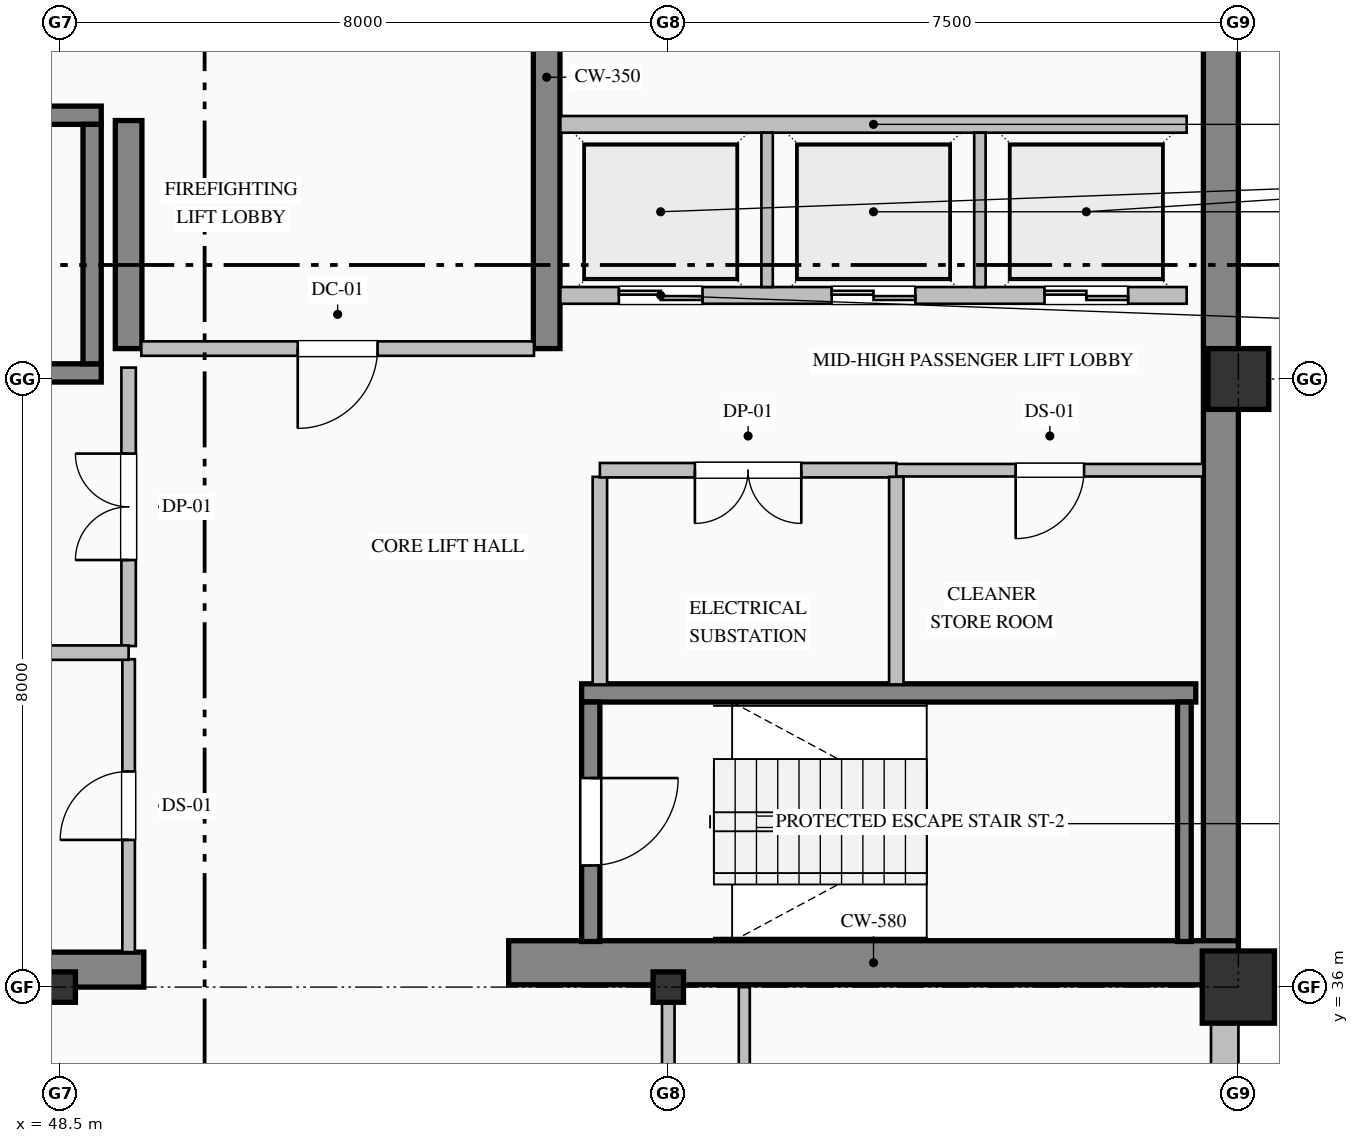
"""IFC4 building model, lengths in metres.
Left out: names, types, materials, properties, quantities, classifications, styles, units other than length and angle.
Written with IfcOpenShell. Run it as: python <this file> out.ifc"""

import sys

from ifc_helpers import new_model, si_unit, direction, frame, frame_2d, origin, origin_2d, place, context, subcontext, project, spatial, rectangle, hollow_rectangle, i_section, extrude, element, fill, save


model = new_model("IFC4")
c1 = context("Model", 3, precision=1e-05, world=origin(), true_north=direction((0.0, 1.0)))
c2 = subcontext(c1, "Body", "Model", "MODEL_VIEW")
j1 = project(units=[si_unit("LENGTHUNIT", "METRE"), si_unit("PLANEANGLEUNIT", "RADIAN")], contexts=[c1])
p1 = place(None, origin())
s1 = spatial("IfcSite", under=j1, at=p1, CompositionType="ELEMENT")
p2 = place(p1, origin())
s2 = spatial("IfcBuilding", under=s1, at=p2, CompositionType="ELEMENT")
p3 = place(p2, frame((0.0, 0.0, 249.8)))
s3 = spatial("IfcBuildingStorey", under=s2, at=p3, CompositionType="ELEMENT", Elevation=249.8)
p4 = place(p3, frame((63.77, 36.32, 0.0), z_axis=(0.0, 0.0, 1.0), x_axis=(0.0, 1.0, 0.0)))
e1 = element("IfcWall", 1, at=p4, inside=s3, PredefinedType="SHEAR", context=c2, shape_type="SweptSolid", body=[
    extrude(rectangle(XDim=15.22, YDim=0.46, at=frame_2d((7.61, 0.0))), origin(), (0.0, 0.0, 1.0), 3.775),
])
p5 = place(p3, frame((40.5, 36.23, 0.0), z_axis=(0.0, 0.0, 1.0), x_axis=(1.0, 0.0, 0.0)))
e2 = element("IfcWall", 2, at=p5, inside=s3, PredefinedType="SHEAR", context=c2, shape_type="SweptSolid", body=[
    extrude(rectangle(XDim=9.1, YDim=0.46, at=frame_2d((4.55, 0.0))), origin(), (0.0, 0.0, 1.0), 3.775),
])
p6 = place(p3, frame((54.4, 36.32, 0.0), z_axis=(0.0, 0.0, 1.0), x_axis=(1.0, 0.0, 0.0)))
e3 = element("IfcWall", 3, at=p6, inside=s3, PredefinedType="SHEAR", context=c2, shape_type="SweptSolid", body=[
    extrude(rectangle(XDim=9.6, YDim=0.58, at=frame_2d((4.8, 0.0))), origin(), (0.0, 0.0, 1.0), 4.0),
])
p7 = place(p3, frame((49.4, 44.4, 0.0), z_axis=(0.0, 0.0, 1.0), x_axis=(0.0, 1.0, 0.0)))
e4 = element("IfcWall", 4, at=p7, inside=s3, PredefinedType="SHEAR", context=c2, shape_type="SweptSolid", body=[
    extrude(rectangle(XDim=3.0, YDim=0.35, at=frame_2d((1.5, 0.0))), origin(), (0.0, 0.0, 1.0), 3.775),
])
p8 = place(p3, frame((54.9, 44.4, 0.0), z_axis=(0.0, 0.0, 1.0), x_axis=(0.0, 1.0, 0.0)))
e5 = element("IfcWall", 5, at=p8, inside=s3, PredefinedType="SHEAR", context=c2, shape_type="SweptSolid", body=[
    extrude(rectangle(XDim=7.14, YDim=0.35, at=frame_2d((3.57, 0.0))), origin(), (0.0, 0.0, 1.0), 3.775),
])
for number, where, z_axis, x_axis in (
    (6, (48.5, 36.0, 0.0), (0.0, 0.0, 1.0), (1.0, 0.0, 0.0)),
    (7, (56.5, 36.0, 0.0), (0.0, 0.0, 1.0), (1.0, 0.0, 0.0)),
):
    element("IfcColumn", number, at=place(p3, frame(where, z_axis=z_axis, x_axis=x_axis)), inside=s3, PredefinedType="COLUMN", context=c2, shape_type="SweptSolid", body=[
        extrude(i_section(OverallWidth=0.4, OverallDepth=0.4, WebThickness=0.013, FlangeThickness=0.021, FilletRadius=0.022, at=origin_2d()), origin(), (0.0, 0.0, 1.0), 4.0),
    ])
p9 = place(p3, frame((64.0, 36.0, 0.0), z_axis=(0.0, 0.0, 1.0), x_axis=(1.0, 0.0, 0.0)))
e8 = element("IfcColumn", 8, at=p9, inside=s3, PredefinedType="COLUMN", context=c2, shape_type="SweptSolid", body=[
    extrude(hollow_rectangle(XDim=0.95, YDim=0.95, WallThickness=0.036, at=origin_2d()), origin(), (0.0, 0.0, 1.0), 4.0),
])
p10 = place(p3, frame((64.0, 44.0, 0.0), z_axis=(0.0, 0.0, 1.0), x_axis=(1.0, 0.0, 0.0)))
e9 = element("IfcColumn", 9, at=p10, inside=s3, PredefinedType="COLUMN", context=c2, shape_type="SweptSolid", body=[
    extrude(hollow_rectangle(XDim=0.8, YDim=0.8, WallThickness=0.032, at=origin_2d()), origin(), (0.0, 0.0, 1.0), 4.0),
])
p11 = place(p3, frame((63.82, 36.05, 0.0), z_axis=(0.0, 0.0, 1.0), x_axis=(0.0, -1.0, 0.0)))
e10 = element("IfcWall", 10, at=p11, inside=s3, PredefinedType="SOLIDWALL", context=c2, shape_type="SweptSolid", body=[
    extrude(rectangle(XDim=19.55, YDim=0.36, at=frame_2d((9.775, 0.0))), origin(), (0.0, 0.0, 1.0), 3.325),
])
p12 = place(p11, frame((3.0, 0.0, 0.9)))
e11 = element("IfcOpeningElement", 11, at=p12, cuts=e10, PredefinedType="OPENING", context=c2, shape_type="SweptSolid", body=[
    extrude(rectangle(XDim=1.2, YDim=1.85, at=frame_2d((0.6, 0.925))), frame((0.0, 0.19, 0.0), z_axis=(0.0, -1.0, 0.0), x_axis=(1.0, 0.0, 0.0)), (0.0, 0.0, 1.0), 0.38),
])
p13 = place(p11, frame((10.05, 0.0, 0.7)))
e12 = element("IfcOpeningElement", 12, at=p13, cuts=e10, PredefinedType="OPENING", context=c2, shape_type="SweptSolid", body=[
    extrude(rectangle(XDim=1.5, YDim=2.4, at=frame_2d((0.75, 1.2))), frame((0.0, 0.19, 0.0), z_axis=(0.0, -1.0, 0.0), x_axis=(1.0, 0.0, 0.0)), (0.0, 0.0, 1.0), 0.38),
])
p14 = place(p11, frame((13.8, 0.0, 0.9)))
e13 = element("IfcOpeningElement", 13, at=p14, cuts=e10, PredefinedType="OPENING", context=c2, shape_type="SweptSolid", body=[
    extrude(rectangle(XDim=1.2, YDim=1.85, at=frame_2d((0.6, 0.925))), frame((0.0, 0.19, 0.0), z_axis=(0.0, -1.0, 0.0), x_axis=(1.0, 0.0, 0.0)), (0.0, 0.0, 1.0), 0.38),
])
for number, where, z_axis, x_axis in (
    (14, (40.96, 47.47, 0.0), (0.0, 0.0, 1.0), (1.0, 0.0, 0.0)),
    (15, (49.04, 44.08, 0.0), (0.0, 0.0, 1.0), (-1.0, 0.0, 0.0)),
):
    element("IfcWall", number, at=place(p3, frame(where, z_axis=z_axis, x_axis=x_axis)), inside=s3, PredefinedType="SOLIDWALL", context=c2, shape_type="SweptSolid", body=[
        extrude(rectangle(XDim=8.08, YDim=0.24, at=frame_2d((4.04, 0.0))), origin(), (0.0, 0.0, 1.0), 4.0),
    ])
p15 = place(p3, frame((48.92, 44.2, 0.0), z_axis=(0.0, 0.0, 1.0), x_axis=(0.0, 1.0, 0.0)))
e16 = element("IfcWall", 16, at=p15, inside=s3, PredefinedType="SOLIDWALL", context=c2, shape_type="SweptSolid", body=[
    extrude(rectangle(XDim=3.15, YDim=0.24, at=frame_2d((1.575, 0.0))), origin(), (0.0, 0.0, 1.0), 4.0),
])
p16 = place(p3, frame((55.36, 39.87, 0.0), z_axis=(0.0, 0.0, 1.0), x_axis=(1.0, 0.0, 0.0)))
e17 = element("IfcWall", 17, at=p16, inside=s3, PredefinedType="SOLIDWALL", context=c2, shape_type="SweptSolid", body=[
    extrude(rectangle(XDim=8.08, YDim=0.24, at=frame_2d((4.04, 0.0))), origin(), (0.0, 0.0, 1.0), 4.0),
])
p17 = place(p3, frame((55.48, 39.75, 0.0), z_axis=(0.0, 0.0, 1.0), x_axis=(0.0, -1.0, 0.0)))
e18 = element("IfcWall", 18, at=p17, inside=s3, PredefinedType="SOLIDWALL", context=c2, shape_type="SweptSolid", body=[
    extrude(rectangle(XDim=3.15, YDim=0.24, at=frame_2d((1.575, 0.0))), origin(), (0.0, 0.0, 1.0), 4.0),
])
p18 = place(p17, frame((1.0, 0.0, 0.0)))
e19 = element("IfcOpeningElement", 19, at=p18, cuts=e18, PredefinedType="OPENING", context=c2, shape_type="SweptSolid", body=[
    extrude(rectangle(XDim=1.15, YDim=2.2, at=frame_2d((0.575, 1.1))), frame((0.0, 0.13, 0.0), z_axis=(0.0, -1.0, 0.0), x_axis=(1.0, 0.0, 0.0)), (0.0, 0.0, 1.0), 0.26),
])
p19 = place(p3, frame((63.29, 36.6, 0.0), z_axis=(0.0, 0.0, 1.0), x_axis=(0.0, 1.0, 0.0)))
e20 = element("IfcWall", 20, at=p19, inside=s3, PredefinedType="SOLIDWALL", context=c2, shape_type="SweptSolid", body=[
    extrude(rectangle(XDim=3.15, YDim=0.18, at=frame_2d((1.575, 0.0))), origin(), (0.0, 0.0, 1.0), 4.0),
])
p20 = place(p3, frame((63.32, 45.1, 0.0), z_axis=(0.0, 0.0, 1.0), x_axis=(-1.0, 0.0, 0.0)))
e21 = element("IfcWall", 21, at=p20, inside=s3, PredefinedType="PARTITIONING", context=c2, shape_type="SweptSolid", body=[
    extrude(rectangle(XDim=8.24, YDim=0.22, at=frame_2d((4.12, 0.0))), origin(), (0.0, 0.0, 1.0), 3.775),
])
p21 = place(p20, frame((6.37, 0.0, 0.0)))
e22 = element("IfcOpeningElement", 22, at=p21, cuts=e21, PredefinedType="OPENING", context=c2, shape_type="SweptSolid", body=[
    extrude(rectangle(XDim=1.1, YDim=2.2, at=frame_2d((0.55, 1.1))), frame((0.0, 0.12, 0.0), z_axis=(0.0, -1.0, 0.0), x_axis=(1.0, 0.0, 0.0)), (0.0, 0.0, 1.0), 0.24),
])
p22 = place(p20, frame((3.57, 0.0, 0.0)))
e23 = element("IfcOpeningElement", 23, at=p22, cuts=e21, PredefinedType="OPENING", context=c2, shape_type="SweptSolid", body=[
    extrude(rectangle(XDim=1.1, YDim=2.2, at=frame_2d((0.55, 1.1))), frame((0.0, 0.12, 0.0), z_axis=(0.0, -1.0, 0.0), x_axis=(1.0, 0.0, 0.0)), (0.0, 0.0, 1.0), 0.24),
])
p23 = place(p20, frame((0.77, 0.0, 0.0)))
e24 = element("IfcOpeningElement", 24, at=p23, cuts=e21, PredefinedType="OPENING", context=c2, shape_type="SweptSolid", body=[
    extrude(rectangle(XDim=1.1, YDim=2.2, at=frame_2d((0.55, 1.1))), frame((0.0, 0.12, 0.0), z_axis=(0.0, -1.0, 0.0), x_axis=(1.0, 0.0, 0.0)), (0.0, 0.0, 1.0), 0.24),
])
p24 = place(p3, frame((55.08, 47.35, 0.0), z_axis=(0.0, 0.0, 1.0), x_axis=(1.0, 0.0, 0.0)))
e25 = element("IfcWall", 25, at=p24, inside=s3, PredefinedType="PARTITIONING", context=c2, shape_type="SweptSolid", body=[
    extrude(rectangle(XDim=8.24, YDim=0.22, at=frame_2d((4.12, 0.0))), origin(), (0.0, 0.0, 1.0), 3.775),
])
for number, where, z_axis, x_axis in (
    (26, (57.8, 45.21, 0.0), (0.0, 0.0, 1.0), (0.0, 1.0, 0.0)),
    (27, (60.6, 45.21, 0.0), (0.0, 0.0, 1.0), (0.0, 1.0, 0.0)),
):
    element("IfcWall", number, at=place(p3, frame(where, z_axis=z_axis, x_axis=x_axis)), inside=s3, PredefinedType="PARTITIONING", context=c2, shape_type="SweptSolid", body=[
        extrude(rectangle(XDim=2.03, YDim=0.15, at=frame_2d((1.015, 0.0))), origin(), (0.0, 0.0, 1.0), 3.775),
    ])
p25 = place(p3, frame((54.733, 44.4, 0.0), z_axis=(0.0, 0.0, 1.0), x_axis=(-1.0, 0.0, 0.0)))
e28 = element("IfcWall", 28, at=p25, inside=s3, PredefinedType="PARTITIONING", context=c2, shape_type="SweptSolid", body=[
    extrude(rectangle(XDim=5.166, YDim=0.19, at=frame_2d((2.583, 0.0))), origin(), (0.0, 0.0, 1.0), 3.775),
])
p26 = place(p25, frame((2.058, 0.0, 0.0)))
e29 = element("IfcOpeningElement", 29, at=p26, cuts=e28, PredefinedType="OPENING", context=c2, shape_type="SweptSolid", body=[
    extrude(rectangle(XDim=1.05, YDim=2.15, at=frame_2d((0.525, 1.075))), frame((0.0, 0.105, 0.0), z_axis=(0.0, -1.0, 0.0), x_axis=(1.0, 0.0, 0.0)), (0.0, 0.0, 1.0), 0.21),
])
p27 = place(p3, frame((49.4, 36.46, 0.0), z_axis=(0.0, 0.0, 1.0), x_axis=(0.0, 1.0, 0.0)))
e30 = element("IfcWall", 30, at=p27, inside=s3, PredefinedType="PARTITIONING", context=c2, shape_type="SweptSolid", body=[
    extrude(rectangle(XDim=3.853, YDim=0.165, at=frame_2d((1.927, 0.0))), origin(), (0.0, 0.0, 1.0), 3.017),
])
p28 = place(p27, frame((1.477, 0.0, 0.0)))
e31 = element("IfcOpeningElement", 31, at=p28, cuts=e30, PredefinedType="OPENING", context=c2, shape_type="SweptSolid", body=[
    extrude(rectangle(XDim=0.9, YDim=2.15, at=frame_2d((0.45, 1.075))), frame((0.0, 0.093, 0.0), z_axis=(0.0, -1.0, 0.0), x_axis=(1.0, 0.0, 0.0)), (0.0, 0.0, 1.0), 0.185),
])
p29 = place(p3, frame((49.4, 40.487, 0.0), z_axis=(0.0, 0.0, 1.0), x_axis=(0.0, 1.0, 0.0)))
e32 = element("IfcWall", 32, at=p29, inside=s3, PredefinedType="PARTITIONING", context=c2, shape_type="SweptSolid", body=[
    extrude(rectangle(XDim=3.663, YDim=0.19, at=frame_2d((1.832, 0.0))), origin(), (0.0, 0.0, 1.0), 3.017),
])
p30 = place(p29, frame((1.132, 0.0, 0.0)))
e33 = element("IfcOpeningElement", 33, at=p30, cuts=e32, PredefinedType="OPENING", context=c2, shape_type="SweptSolid", body=[
    extrude(rectangle(XDim=1.4, YDim=2.25, at=frame_2d((0.7, 1.125))), frame((0.0, 0.105, 0.0), z_axis=(0.0, -1.0, 0.0), x_axis=(1.0, 0.0, 0.0)), (0.0, 0.0, 1.0), 0.21),
])
p31 = place(p3, frame((55.6, 42.713, 0.0), z_axis=(0.0, 0.0, 1.0), x_axis=(0.0, -1.0, 0.0)))
e34 = element("IfcWall", 34, at=p31, inside=s3, PredefinedType="PARTITIONING", context=c2, shape_type="SweptSolid", body=[
    extrude(rectangle(XDim=2.731, YDim=0.19, at=frame_2d((1.365, 0.0))), origin(), (0.0, 0.0, 1.0), 3.775),
])
p32 = place(p3, frame((40.96, 40.4, 0.0), z_axis=(0.0, 0.0, 1.0), x_axis=(1.0, 0.0, 0.0)))
e35 = element("IfcWall", 35, at=p32, inside=s3, PredefinedType="PARTITIONING", context=c2, shape_type="SweptSolid", body=[
    extrude(rectangle(XDim=8.44, YDim=0.19, at=frame_2d((4.22, 0.0))), origin(), (0.0, 0.0, 1.0), 3.775),
])
p33 = place(p3, frame((59.5, 42.8, 0.0), z_axis=(0.0, 0.0, 1.0), x_axis=(-1.0, 0.0, 0.0)))
e36 = element("IfcWall", 36, at=p33, inside=s3, PredefinedType="PARTITIONING", context=c2, shape_type="SweptSolid", body=[
    extrude(rectangle(XDim=3.9, YDim=0.19, at=frame_2d((1.95, 0.0))), origin(), (0.0, 0.0, 1.0), 3.775),
])
p34 = place(p33, frame((1.25, 0.0, 0.0)))
e37 = element("IfcOpeningElement", 37, at=p34, cuts=e36, PredefinedType="OPENING", context=c2, shape_type="SweptSolid", body=[
    extrude(rectangle(XDim=1.4, YDim=2.25, at=frame_2d((0.7, 1.125))), frame((0.0, 0.105, 0.0), z_axis=(0.0, -1.0, 0.0), x_axis=(1.0, 0.0, 0.0)), (0.0, 0.0, 1.0), 0.21),
])
p35 = place(p3, frame((63.54, 42.8, 0.0), z_axis=(0.0, 0.0, 1.0), x_axis=(-1.0, 0.0, 0.0)))
e38 = element("IfcWall", 38, at=p35, inside=s3, PredefinedType="PARTITIONING", context=c2, shape_type="SweptSolid", body=[
    extrude(rectangle(XDim=4.04, YDim=0.165, at=frame_2d((2.02, 0.0))), origin(), (0.0, 0.0, 1.0), 3.775),
])
p36 = place(p35, frame((1.57, 0.0, 0.0)))
e39 = element("IfcOpeningElement", 39, at=p36, cuts=e38, PredefinedType="OPENING", context=c2, shape_type="SweptSolid", body=[
    extrude(rectangle(XDim=0.9, YDim=2.15, at=frame_2d((0.45, 1.075))), frame((0.0, 0.093, 0.0), z_axis=(0.0, -1.0, 0.0), x_axis=(1.0, 0.0, 0.0)), (0.0, 0.0, 1.0), 0.185),
])
p37 = place(p3, frame((59.5, 42.713, 0.0), z_axis=(0.0, 0.0, 1.0), x_axis=(0.0, -1.0, 0.0)))
e40 = element("IfcWall", 40, at=p37, inside=s3, PredefinedType="PARTITIONING", context=c2, shape_type="SweptSolid", body=[
    extrude(rectangle(XDim=2.731, YDim=0.19, at=frame_2d((1.365, 0.0))), origin(), (0.0, 0.0, 1.0), 3.775),
])
p38 = place(p3, frame((56.5, 36.0, 0.0), z_axis=(0.0, 0.0, 1.0), x_axis=(0.0, -1.0, 0.0)))
e41 = element("IfcWall", 41, at=p38, inside=s3, PredefinedType="PARTITIONING", context=c2, shape_type="SweptSolid", body=[
    extrude(rectangle(XDim=5.525, YDim=0.165, at=frame_2d((2.763, 0.0))), origin(), (0.0, 0.0, 1.0), 3.179),
])
p39 = place(p3, frame((57.5, 36.0, 0.0), z_axis=(0.0, 0.0, 1.0), x_axis=(0.0, -1.0, 0.0)))
e42 = element("IfcWall", 42, at=p39, inside=s3, PredefinedType="PARTITIONING", context=c2, shape_type="SweptSolid", body=[
    extrude(rectangle(XDim=12.525, YDim=0.145, at=frame_2d((6.263, 0.0))), origin(), (0.0, 0.0, 1.0), 3.775),
])
p40 = place(p39, frame((5.763, 0.0, 0.0)))
e43 = element("IfcOpeningElement", 43, at=p40, cuts=e42, PredefinedType="OPENING", context=c2, shape_type="SweptSolid", body=[
    extrude(rectangle(XDim=1.0, YDim=2.15, at=frame_2d((0.5, 1.075))), frame((0.0, 0.083, 0.0), z_axis=(0.0, -1.0, 0.0), x_axis=(1.0, 0.0, 0.0)), (0.0, 0.0, 1.0), 0.165),
])
p41 = place(p18, origin())
e44 = element("IfcDoor", 44, at=p41, inside=s3, OperationType="SINGLE_SWING_LEFT", PredefinedType="DOOR", context=c2, shape_type="SweptSolid", body=[
    extrude(rectangle(XDim=1.15, YDim=2.2, at=frame_2d((0.575, 1.1))), frame((0.0, 0.025, 0.0), z_axis=(0.0, -1.0, 0.0), x_axis=(1.0, 0.0, 0.0)), (0.0, 0.0, 1.0), 0.05),
])
fill(e19, e44)
p42 = place(p21, origin())
e45 = element("IfcDoor", 45, at=p42, inside=s3, OperationType="DOUBLE_DOOR_SLIDING", PredefinedType="DOOR", context=c2, shape_type="SweptSolid", body=[
    extrude(rectangle(XDim=1.1, YDim=2.2, at=frame_2d((0.55, 1.1))), frame((0.0, 0.025, 0.0), z_axis=(0.0, -1.0, 0.0), x_axis=(1.0, 0.0, 0.0)), (0.0, 0.0, 1.0), 0.05),
])
fill(e22, e45)
p43 = place(p22, origin())
e46 = element("IfcDoor", 46, at=p43, inside=s3, OperationType="DOUBLE_DOOR_SLIDING", PredefinedType="DOOR", context=c2, shape_type="SweptSolid", body=[
    extrude(rectangle(XDim=1.1, YDim=2.2, at=frame_2d((0.55, 1.1))), frame((0.0, 0.025, 0.0), z_axis=(0.0, -1.0, 0.0), x_axis=(1.0, 0.0, 0.0)), (0.0, 0.0, 1.0), 0.05),
])
fill(e23, e46)
p44 = place(p23, origin())
e47 = element("IfcDoor", 47, at=p44, inside=s3, OperationType="DOUBLE_DOOR_SLIDING", PredefinedType="DOOR", context=c2, shape_type="SweptSolid", body=[
    extrude(rectangle(XDim=1.1, YDim=2.2, at=frame_2d((0.55, 1.1))), frame((0.0, 0.025, 0.0), z_axis=(0.0, -1.0, 0.0), x_axis=(1.0, 0.0, 0.0)), (0.0, 0.0, 1.0), 0.05),
])
fill(e24, e47)
p45 = place(p26, origin())
e48 = element("IfcDoor", 48, at=p45, inside=s3, OperationType="SINGLE_SWING_RIGHT", PredefinedType="DOOR", context=c2, shape_type="SweptSolid", body=[
    extrude(rectangle(XDim=1.05, YDim=2.15, at=frame_2d((0.525, 1.075))), frame((0.0, 0.025, 0.0), z_axis=(0.0, -1.0, 0.0), x_axis=(1.0, 0.0, 0.0)), (0.0, 0.0, 1.0), 0.05),
])
fill(e29, e48)
p46 = place(p28, origin())
e49 = element("IfcDoor", 49, at=p46, inside=s3, OperationType="SINGLE_SWING_LEFT", PredefinedType="DOOR", context=c2, shape_type="SweptSolid", body=[
    extrude(rectangle(XDim=0.9, YDim=2.15, at=frame_2d((0.45, 1.075))), frame((0.0, 0.025, 0.0), z_axis=(0.0, -1.0, 0.0), x_axis=(1.0, 0.0, 0.0)), (0.0, 0.0, 1.0), 0.05),
])
fill(e31, e49)
p47 = place(p30, origin())
e50 = element("IfcDoor", 50, at=p47, inside=s3, OperationType="DOUBLE_DOOR_SINGLE_SWING", PredefinedType="DOOR", context=c2, shape_type="SweptSolid", body=[
    extrude(rectangle(XDim=1.4, YDim=2.25, at=frame_2d((0.7, 1.125))), frame((0.0, 0.025, 0.0), z_axis=(0.0, -1.0, 0.0), x_axis=(1.0, 0.0, 0.0)), (0.0, 0.0, 1.0), 0.05),
])
fill(e33, e50)
p48 = place(p34, origin())
e51 = element("IfcDoor", 51, at=p48, inside=s3, OperationType="DOUBLE_DOOR_SINGLE_SWING", PredefinedType="DOOR", context=c2, shape_type="SweptSolid", body=[
    extrude(rectangle(XDim=1.4, YDim=2.25, at=frame_2d((0.7, 1.125))), frame((0.0, 0.025, 0.0), z_axis=(0.0, -1.0, 0.0), x_axis=(1.0, 0.0, 0.0)), (0.0, 0.0, 1.0), 0.05),
])
fill(e37, e51)
p49 = place(p36, origin())
e52 = element("IfcDoor", 52, at=p49, inside=s3, OperationType="SINGLE_SWING_RIGHT", PredefinedType="DOOR", context=c2, shape_type="SweptSolid", body=[
    extrude(rectangle(XDim=0.9, YDim=2.15, at=frame_2d((0.45, 1.075))), frame((0.0, 0.025, 0.0), z_axis=(0.0, -1.0, 0.0), x_axis=(1.0, 0.0, 0.0)), (0.0, 0.0, 1.0), 0.05),
])
fill(e39, e52)
save(model, sys.argv[1])
